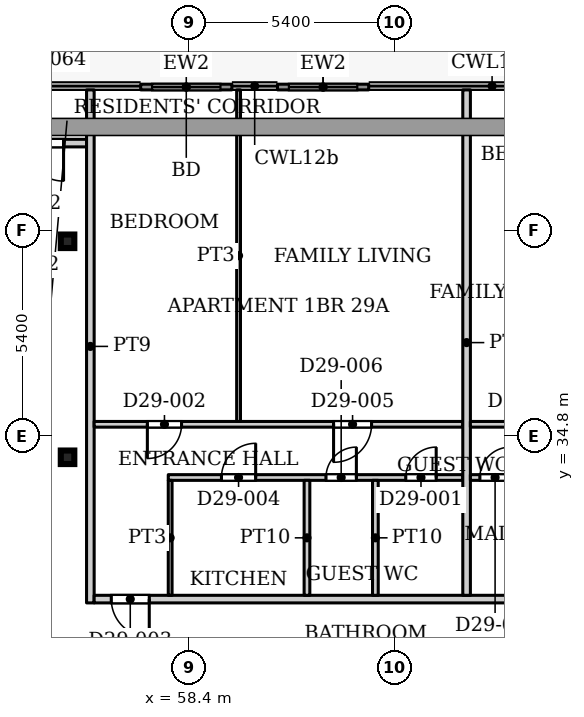
"""IFC4 building model, lengths in metres.
Left out: names, types, materials, properties, quantities, classifications, styles, units other than length and angle.
Written with IfcOpenShell. Run it as: python <this file> out.ifc"""

import sys

from ifc_helpers import new_model, si_unit, direction, frame, frame_2d, origin, origin_2d, place, context, subcontext, project, spatial, rectangle, hollow_rectangle, extrude, source, transform, mapped, element, fill, save


model = new_model("IFC4")
c1 = context("Model", 3, precision=1e-05, world=origin(), true_north=direction((0.0, 1.0)))
c2 = subcontext(c1, "Body", "Model", "MODEL_VIEW")
j1 = project(units=[si_unit("LENGTHUNIT", "METRE"), si_unit("PLANEANGLEUNIT", "RADIAN")], contexts=[c1])
p1 = place(None, origin())
s1 = spatial("IfcSite", under=j1, at=p1, CompositionType="ELEMENT")
p2 = place(p1, origin())
s2 = spatial("IfcBuilding", under=s1, at=p2, CompositionType="ELEMENT")
p3 = place(p2, frame((0.0, 0.0, 125.3)))
s3 = spatial("IfcBuildingStorey", under=s2, at=p3, CompositionType="ELEMENT", Elevation=125.3)
for number, where, z_axis, x_axis in (
    (1, (55.2, 34.232, 0.0), (0.0, 0.0, 1.0), (1.0, 0.0, 0.0)),
    (2, (55.2, 39.916, 0.0), (0.0, 0.0, 1.0), (1.0, 0.0, 0.0)),
):
    element("IfcColumn", number, at=place(p3, frame(where, z_axis=z_axis, x_axis=x_axis)), inside=s3, PredefinedType="COLUMN", context=c2, shape_type="SweptSolid", body=[
        extrude(hollow_rectangle(XDim=0.356, YDim=0.356, WallThickness=0.016, InnerFilletRadius=0.016, OuterFilletRadius=0.032, at=origin_2d()), origin(), (0.0, 0.0, 1.0), 3.9),
    ])
p4 = place(p3, frame((57.124, 43.975, 0.0), z_axis=(0.0, 0.0, 1.0), x_axis=(1.0, 0.0, 0.0)))
e3 = element("IfcWall", 3, at=p4, inside=s3, PredefinedType="SOLIDWALL", context=c2, shape_type="SweptSolid", body=[
    extrude(rectangle(XDim=2.4, YDim=0.15, at=frame_2d((1.2, 0.0))), origin(), (0.0, 0.0, 1.0), 3.75),
])
p5 = place(p4, frame((0.3, 0.0, 0.0)))
e4 = element("IfcOpeningElement", 4, at=p5, cuts=e3, PredefinedType="OPENING", context=c2, shape_type="SweptSolid", body=[
    extrude(rectangle(XDim=1.8, YDim=2.4, at=frame_2d((0.9, 1.2))), frame((0.0, 0.085, 0.0), z_axis=(0.0, -1.0, 0.0), x_axis=(1.0, 0.0, 0.0)), (0.0, 0.0, 1.0), 0.17),
])
p6 = place(p3, frame((60.724, 43.975, 0.0), z_axis=(0.0, 0.0, 1.0), x_axis=(1.0, 0.0, 0.0)))
e5 = element("IfcWall", 5, at=p6, inside=s3, PredefinedType="SOLIDWALL", context=c2, shape_type="SweptSolid", body=[
    extrude(rectangle(XDim=2.4, YDim=0.15, at=frame_2d((1.2, 0.0))), origin(), (0.0, 0.0, 1.0), 3.75),
])
p7 = place(p6, frame((0.3, 0.0, 0.0)))
e6 = element("IfcOpeningElement", 6, at=p7, cuts=e5, PredefinedType="OPENING", context=c2, shape_type="SweptSolid", body=[
    extrude(rectangle(XDim=1.8, YDim=2.4, at=frame_2d((0.9, 1.2))), frame((0.0, 0.085, 0.0), z_axis=(0.0, -1.0, 0.0), x_axis=(1.0, 0.0, 0.0)), (0.0, 0.0, 1.0), 0.17),
])
p8 = place(p3, frame((53.4, 42.5, 0.0), z_axis=(0.0, 0.0, 1.0), x_axis=(1.0, 0.0, 0.0)))
e7 = element("IfcWall", 7, at=p8, inside=s3, PredefinedType="PARTITIONING", context=c2, shape_type="SweptSolid", body=[
    extrude(rectangle(XDim=2.3, YDim=0.2, at=frame_2d((1.15, 0.0))), origin(), (0.0, 0.0, 1.0), 3.6),
])
p9 = place(p8, frame((0.695, 0.0, 0.0)))
e8 = element("IfcOpeningElement", 8, at=p9, cuts=e7, PredefinedType="OPENING", context=c2, shape_type="SweptSolid", body=[
    extrude(rectangle(XDim=1.0, YDim=2.1, at=frame_2d((0.5, 1.05))), frame((0.0, 0.11, 0.0), z_axis=(0.0, -1.0, 0.0), x_axis=(1.0, 0.0, 0.0)), (0.0, 0.0, 1.0), 0.22),
])
p10 = place(p3, frame((55.8, 30.4, 0.0), z_axis=(0.0, 0.0, 1.0), x_axis=(0.0, 1.0, 0.0)))
e9 = element("IfcWall", 9, at=p10, inside=s3, PredefinedType="PARTITIONING", context=c2, shape_type="SweptSolid", body=[
    extrude(rectangle(XDim=13.5, YDim=0.2, at=frame_2d((6.75, 0.0))), origin(), (0.0, 0.0, 1.0), 3.6),
])
p11 = place(p3, frame((55.9, 30.5, 0.0), z_axis=(0.0, 0.0, 1.0), x_axis=(1.0, 0.0, 0.0)))
e10 = element("IfcWall", 10, at=p11, inside=s3, PredefinedType="PARTITIONING", context=c2, shape_type="SweptSolid", body=[
    extrude(rectangle(XDim=42.2, YDim=0.2, at=frame_2d((21.1, 0.0))), origin(), (0.0, 0.0, 1.0), 3.6),
])
p12 = place(p11, frame((0.45, 0.0, 0.0)))
e11 = element("IfcOpeningElement", 11, at=p12, cuts=e10, PredefinedType="OPENING", context=c2, shape_type="SweptSolid", body=[
    extrude(rectangle(XDim=1.0, YDim=2.1, at=frame_2d((0.5, 1.05))), frame((0.0, 0.11, 0.0), z_axis=(0.0, -1.0, 0.0), x_axis=(1.0, 0.0, 0.0)), (0.0, 0.0, 1.0), 0.22),
])
p13 = place(p11, frame((20.1, 0.0, 0.0)))
e12 = element("IfcOpeningElement", 12, at=p13, cuts=e10, PredefinedType="OPENING", context=c2, shape_type="SweptSolid", body=[
    extrude(rectangle(XDim=1.0, YDim=2.1, at=frame_2d((0.5, 1.05))), frame((0.0, 0.11, 0.0), z_axis=(0.0, -1.0, 0.0), x_axis=(1.0, 0.0, 0.0)), (0.0, 0.0, 1.0), 0.22),
])
p14 = place(p11, frame((33.75, 0.0, 0.0)))
e13 = element("IfcOpeningElement", 13, at=p14, cuts=e10, PredefinedType="OPENING", context=c2, shape_type="SweptSolid", body=[
    extrude(rectangle(XDim=1.0, YDim=2.1, at=frame_2d((0.5, 1.05))), frame((0.0, 0.11, 0.0), z_axis=(0.0, -1.0, 0.0), x_axis=(1.0, 0.0, 0.0)), (0.0, 0.0, 1.0), 0.22),
])
p15 = place(p11, frame((38.7, 0.0, 0.0)))
e14 = element("IfcOpeningElement", 14, at=p15, cuts=e10, PredefinedType="OPENING", context=c2, shape_type="SweptSolid", body=[
    extrude(rectangle(XDim=1.0, YDim=2.1, at=frame_2d((0.5, 1.05))), frame((0.0, 0.11, 0.0), z_axis=(0.0, -1.0, 0.0), x_axis=(1.0, 0.0, 0.0)), (0.0, 0.0, 1.0), 0.22),
])
p16 = place(p3, frame((55.9, 35.1, 0.0), z_axis=(0.0, 0.0, 1.0), x_axis=(1.0, 0.0, 0.0)))
e15 = element("IfcWall", 15, at=p16, inside=s3, PredefinedType="PARTITIONING", context=c2, shape_type="SweptSolid", body=[
    extrude(rectangle(XDim=9.7, YDim=0.15, at=frame_2d((4.85, 0.0))), origin(), (0.0, 0.0, 1.0), 3.6),
])
p17 = place(p16, frame((1.4, 0.0, 0.0)))
e16 = element("IfcOpeningElement", 16, at=p17, cuts=e15, PredefinedType="OPENING", context=c2, shape_type="SweptSolid", body=[
    extrude(rectangle(XDim=0.9, YDim=2.1, at=frame_2d((0.45, 1.05))), frame((0.0, 0.085, 0.0), z_axis=(0.0, -1.0, 0.0), x_axis=(1.0, 0.0, 0.0)), (0.0, 0.0, 1.0), 0.17),
])
p18 = place(p16, frame((6.3, 0.0, 0.0)))
e17 = element("IfcOpeningElement", 17, at=p18, cuts=e15, PredefinedType="OPENING", context=c2, shape_type="SweptSolid", body=[
    extrude(rectangle(XDim=1.0, YDim=2.1, at=frame_2d((0.5, 1.05))), frame((0.0, 0.085, 0.0), z_axis=(0.0, -1.0, 0.0), x_axis=(1.0, 0.0, 0.0)), (0.0, 0.0, 1.0), 0.17),
])
p19 = place(p3, frame((57.85, 33.7, 0.0), z_axis=(0.0, 0.0, 1.0), x_axis=(1.0, 0.0, 0.0)))
e18 = element("IfcWall", 18, at=p19, inside=s3, PredefinedType="PARTITIONING", context=c2, shape_type="SweptSolid", body=[
    extrude(rectangle(XDim=7.75, YDim=0.15, at=frame_2d((3.875, 0.0))), origin(), (0.0, 0.0, 1.0), 3.6),
])
p20 = place(p19, frame((6.25, 0.0, 0.0)))
e19 = element("IfcOpeningElement", 19, at=p20, cuts=e18, PredefinedType="OPENING", context=c2, shape_type="SweptSolid", body=[
    extrude(rectangle(XDim=0.8, YDim=2.1, at=frame_2d((0.4, 1.05))), frame((0.0, 0.085, 0.0), z_axis=(0.0, -1.0, 0.0), x_axis=(1.0, 0.0, 0.0)), (0.0, 0.0, 1.0), 0.17),
])
p21 = place(p19, frame((1.4, 0.0, 0.0)))
e20 = element("IfcOpeningElement", 20, at=p21, cuts=e18, PredefinedType="OPENING", context=c2, shape_type="SweptSolid", body=[
    extrude(rectangle(XDim=0.9, YDim=2.1, at=frame_2d((0.45, 1.05))), frame((0.0, 0.085, 0.0), z_axis=(0.0, -1.0, 0.0), x_axis=(1.0, 0.0, 0.0)), (0.0, 0.0, 1.0), 0.17),
])
p22 = place(p19, frame((4.15, 0.0, 0.0)))
e21 = element("IfcOpeningElement", 21, at=p22, cuts=e18, PredefinedType="OPENING", context=c2, shape_type="SweptSolid", body=[
    extrude(rectangle(XDim=0.8, YDim=2.1, at=frame_2d((0.4, 1.05))), frame((0.0, 0.085, 0.0), z_axis=(0.0, -1.0, 0.0), x_axis=(1.0, 0.0, 0.0)), (0.0, 0.0, 1.0), 0.17),
])
p23 = place(p3, frame((57.9, 30.6, 0.0), z_axis=(0.0, 0.0, 1.0), x_axis=(0.0, 1.0, 0.0)))
e22 = element("IfcWall", 22, at=p23, inside=s3, PredefinedType="PARTITIONING", context=c2, shape_type="SweptSolid", body=[
    extrude(rectangle(XDim=3.025, YDim=0.1, at=frame_2d((1.512, 0.0))), origin(), (0.0, 0.0, 1.0), 3.6),
])
p24 = place(p3, frame((59.7, 35.175, 0.0), z_axis=(0.0, 0.0, 1.0), x_axis=(0.0, 1.0, 0.0)))
e23 = element("IfcWall", 23, at=p24, inside=s3, PredefinedType="PARTITIONING", context=c2, shape_type="SweptSolid", body=[
    extrude(rectangle(XDim=8.725, YDim=0.1, at=frame_2d((4.362, 0.0))), origin(), (0.0, 0.0, 1.0), 3.6),
])
for number, where, z_axis, x_axis in (
    (24, (61.5, 30.6, 0.0), (0.0, 0.0, 1.0), (0.0, 1.0, 0.0)),
    (25, (63.3, 30.6, 0.0), (0.0, 0.0, 1.0), (0.0, 1.0, 0.0)),
):
    element("IfcWall", number, at=place(p3, frame(where, z_axis=z_axis, x_axis=x_axis)), inside=s3, PredefinedType="PARTITIONING", context=c2, shape_type="SweptSolid", body=[
        extrude(rectangle(XDim=3.025, YDim=0.15, at=frame_2d((1.512, 0.0))), origin(), (0.0, 0.0, 1.0), 3.6),
    ])
p25 = place(p3, frame((65.7, 30.6, 0.0), z_axis=(0.0, 0.0, 1.0), x_axis=(0.0, 1.0, 0.0)))
e26 = element("IfcWall", 26, at=p25, inside=s3, PredefinedType="PARTITIONING", context=c2, shape_type="SweptSolid", body=[
    extrude(rectangle(XDim=13.3, YDim=0.2, at=frame_2d((6.65, 0.0))), origin(), (0.0, 0.0, 1.0), 3.6),
])
p26 = place(p3, frame((65.8, 33.7, 0.0), z_axis=(0.0, 0.0, 1.0), x_axis=(1.0, 0.0, 0.0)))
e27 = element("IfcWall", 27, at=p26, inside=s3, PredefinedType="PARTITIONING", context=c2, shape_type="SweptSolid", body=[
    extrude(rectangle(XDim=9.875, YDim=0.15, at=frame_2d((4.938, 0.0))), origin(), (0.0, 0.0, 1.0), 3.6),
])
p27 = place(p26, frame((8.35, 0.0, 0.0)))
e28 = element("IfcOpeningElement", 28, at=p27, cuts=e27, PredefinedType="OPENING", context=c2, shape_type="SweptSolid", body=[
    extrude(rectangle(XDim=0.8, YDim=2.1, at=frame_2d((0.4, 1.05))), frame((0.0, 0.085, 0.0), z_axis=(0.0, -1.0, 0.0), x_axis=(1.0, 0.0, 0.0)), (0.0, 0.0, 1.0), 0.17),
])
p28 = place(p26, frame((5.75, 0.0, 0.0)))
e29 = element("IfcOpeningElement", 29, at=p28, cuts=e27, PredefinedType="OPENING", context=c2, shape_type="SweptSolid", body=[
    extrude(rectangle(XDim=0.9, YDim=2.1, at=frame_2d((0.45, 1.05))), frame((0.0, 0.085, 0.0), z_axis=(0.0, -1.0, 0.0), x_axis=(1.0, 0.0, 0.0)), (0.0, 0.0, 1.0), 0.17),
])
p29 = place(p26, frame((3.6, 0.0, 0.0)))
e30 = element("IfcOpeningElement", 30, at=p29, cuts=e27, PredefinedType="OPENING", context=c2, shape_type="SweptSolid", body=[
    extrude(rectangle(XDim=0.8, YDim=2.1, at=frame_2d((0.4, 1.05))), frame((0.0, 0.085, 0.0), z_axis=(0.0, -1.0, 0.0), x_axis=(1.0, 0.0, 0.0)), (0.0, 0.0, 1.0), 0.17),
])
p30 = place(p26, frame((0.25, 0.0, 0.0)))
e31 = element("IfcOpeningElement", 31, at=p30, cuts=e27, PredefinedType="OPENING", context=c2, shape_type="SweptSolid", body=[
    extrude(rectangle(XDim=0.8, YDim=2.1, at=frame_2d((0.4, 1.05))), frame((0.0, 0.085, 0.0), z_axis=(0.0, -1.0, 0.0), x_axis=(1.0, 0.0, 0.0)), (0.0, 0.0, 1.0), 0.17),
])
p31 = place(p3, frame((65.8, 35.1, 0.0), z_axis=(0.0, 0.0, 1.0), x_axis=(1.0, 0.0, 0.0)))
e32 = element("IfcWall", 32, at=p31, inside=s3, PredefinedType="PARTITIONING", context=c2, shape_type="SweptSolid", body=[
    extrude(rectangle(XDim=15.7, YDim=0.15, at=frame_2d((7.85, 0.0))), origin(), (0.0, 0.0, 1.0), 3.6),
])
p32 = place(p31, frame((3.95, 0.0, 0.0)))
e33 = element("IfcOpeningElement", 33, at=p32, cuts=e32, PredefinedType="OPENING", context=c2, shape_type="SweptSolid", body=[
    extrude(rectangle(XDim=0.9, YDim=2.1, at=frame_2d((0.45, 1.05))), frame((0.0, 0.085, 0.0), z_axis=(0.0, -1.0, 0.0), x_axis=(1.0, 0.0, 0.0)), (0.0, 0.0, 1.0), 0.17),
])
p33 = place(p31, frame((14.0, 0.0, 0.0)))
e34 = element("IfcOpeningElement", 34, at=p33, cuts=e32, PredefinedType="OPENING", context=c2, shape_type="SweptSolid", body=[
    extrude(rectangle(XDim=0.9, YDim=2.1, at=frame_2d((0.45, 1.05))), frame((0.0, 0.085, 0.0), z_axis=(0.0, -1.0, 0.0), x_axis=(1.0, 0.0, 0.0)), (0.0, 0.0, 1.0), 0.17),
])
p34 = place(p31, frame((1.05, 0.0, 0.0)))
e35 = element("IfcOpeningElement", 35, at=p34, cuts=e32, PredefinedType="OPENING", context=c2, shape_type="SweptSolid", body=[
    extrude(rectangle(XDim=1.0, YDim=2.1, at=frame_2d((0.5, 1.05))), frame((0.0, 0.085, 0.0), z_axis=(0.0, -1.0, 0.0), x_axis=(1.0, 0.0, 0.0)), (0.0, 0.0, 1.0), 0.17),
])
p35 = place(p31, frame((10.5, 0.0, 0.0)))
e36 = element("IfcOpeningElement", 36, at=p35, cuts=e32, PredefinedType="OPENING", context=c2, shape_type="SweptSolid", body=[
    extrude(rectangle(XDim=1.6, YDim=2.1, at=frame_2d((0.8, 1.05))), frame((0.0, 0.085, 0.0), z_axis=(0.0, -1.0, 0.0), x_axis=(1.0, 0.0, 0.0)), (0.0, 0.0, 1.0), 0.17),
])
p36 = place(p31, frame((6.05, 0.0, 0.0)))
e37 = element("IfcOpeningElement", 37, at=p36, cuts=e32, PredefinedType="OPENING", context=c2, shape_type="SweptSolid", body=[
    extrude(rectangle(XDim=0.9, YDim=2.1, at=frame_2d((0.45, 1.05))), frame((0.0, 0.085, 0.0), z_axis=(0.0, -1.0, 0.0), x_axis=(1.0, 0.0, 0.0)), (0.0, 0.0, 1.0), 0.17),
])
m1 = source(origin(), c2, "Body", "SweptSolid", [
    extrude(rectangle(XDim=1.8, YDim=2.4, at=frame_2d((0.9, 1.2))), frame((0.0, 0.025, 0.0), z_axis=(0.0, -1.0, 0.0), x_axis=(1.0, 0.0, 0.0)), (0.0, 0.0, 1.0), 0.05),
])
p37 = place(p5, origin())
e38 = element("IfcDoor", 38, at=p37, inside=s3, OperationType="SLIDING_TO_LEFT", PredefinedType="DOOR", context=c2, shape_type="MappedRepresentation", body=[
    mapped(m1, transform((0.0, 0.0, 0.0), x_axis=(1.0, 0.0, 0.0), y_axis=(0.0, 1.0, 0.0), z_axis=(0.0, 0.0, 1.0), scale=1.0)),
])
fill(e4, e38)
p38 = place(p7, origin())
e39 = element("IfcDoor", 39, at=p38, inside=s3, OperationType="SLIDING_TO_LEFT", PredefinedType="DOOR", context=c2, shape_type="MappedRepresentation", body=[
    mapped(m1, transform((0.0, 0.0, 0.0), x_axis=(1.0, 0.0, 0.0), y_axis=(0.0, 1.0, 0.0), z_axis=(0.0, 0.0, 1.0), scale=1.0)),
])
fill(e6, e39)
m2 = source(origin(), c2, "Body", "SweptSolid", [
    extrude(rectangle(XDim=0.8, YDim=2.1, at=frame_2d((0.4, 1.05))), frame((0.0, 0.025, 0.0), z_axis=(0.0, -1.0, 0.0), x_axis=(1.0, 0.0, 0.0)), (0.0, 0.0, 1.0), 0.05),
])
p39 = place(p20, origin())
e40 = element("IfcDoor", 40, at=p39, inside=s3, OperationType="SINGLE_SWING_LEFT", PredefinedType="DOOR", context=c2, shape_type="MappedRepresentation", body=[
    mapped(m2, transform((0.0, 0.0, 0.0), x_axis=(1.0, 0.0, 0.0), y_axis=(0.0, 1.0, 0.0), z_axis=(0.0, 0.0, 1.0), scale=1.0)),
])
fill(e19, e40)
m3 = source(origin(), c2, "Body", "SweptSolid", [
    extrude(rectangle(XDim=0.9, YDim=2.1, at=frame_2d((0.45, 1.05))), frame((0.0, 0.025, 0.0), z_axis=(0.0, -1.0, 0.0), x_axis=(1.0, 0.0, 0.0)), (0.0, 0.0, 1.0), 0.05),
])
p40 = place(p17, origin())
e41 = element("IfcDoor", 41, at=p40, inside=s3, OperationType="SINGLE_SWING_RIGHT", PredefinedType="DOOR", context=c2, shape_type="MappedRepresentation", body=[
    mapped(m3, transform((0.0, 0.0, 0.0), x_axis=(1.0, 0.0, 0.0), y_axis=(0.0, 1.0, 0.0), z_axis=(0.0, 0.0, 1.0), scale=1.0)),
])
fill(e16, e41)
m4 = source(origin(), c2, "Body", "SweptSolid", [
    extrude(rectangle(XDim=1.0, YDim=2.1, at=frame_2d((0.5, 1.05))), frame((0.0, 0.025, 0.0), z_axis=(0.0, -1.0, 0.0), x_axis=(1.0, 0.0, 0.0)), (0.0, 0.0, 1.0), 0.05),
])
p41 = place(p12, origin())
e42 = element("IfcDoor", 42, at=p41, inside=s3, OperationType="SINGLE_SWING_RIGHT", PredefinedType="DOOR", context=c2, shape_type="MappedRepresentation", body=[
    mapped(m4, transform((0.0, 0.0, 0.0), x_axis=(1.0, 0.0, 0.0), y_axis=(0.0, 1.0, 0.0), z_axis=(0.0, 0.0, 1.0), scale=1.0)),
])
fill(e11, e42)
p42 = place(p21, origin())
e43 = element("IfcDoor", 43, at=p42, inside=s3, OperationType="SINGLE_SWING_LEFT", PredefinedType="DOOR", context=c2, shape_type="MappedRepresentation", body=[
    mapped(m3, transform((0.0, 0.0, 0.0), x_axis=(1.0, 0.0, 0.0), y_axis=(0.0, 1.0, 0.0), z_axis=(0.0, 0.0, 1.0), scale=1.0)),
])
fill(e20, e43)
m5 = source(origin(), c2, "Body", "SweptSolid", [
    extrude(rectangle(XDim=1.0, YDim=2.1, at=frame_2d((0.5, 1.05))), frame((0.0, 0.025, 0.0), z_axis=(0.0, -1.0, 0.0), x_axis=(1.0, 0.0, 0.0)), (0.0, 0.0, 1.0), 0.05),
])
p43 = place(p18, origin())
e44 = element("IfcDoor", 44, at=p43, inside=s3, OperationType="SINGLE_SWING_RIGHT", PredefinedType="DOOR", context=c2, shape_type="MappedRepresentation", body=[
    mapped(m5, transform((0.0, 0.0, 0.0), x_axis=(1.0, 0.0, 0.0), y_axis=(0.0, 1.0, 0.0), z_axis=(0.0, 0.0, 1.0), scale=1.0)),
])
fill(e17, e44)
p44 = place(p22, origin())
e45 = element("IfcDoor", 45, at=p44, inside=s3, OperationType="SINGLE_SWING_LEFT", PredefinedType="DOOR", context=c2, shape_type="MappedRepresentation", body=[
    mapped(m2, transform((0.0, 0.0, 0.0), x_axis=(1.0, 0.0, 0.0), y_axis=(0.0, 1.0, 0.0), z_axis=(0.0, 0.0, 1.0), scale=1.0)),
])
fill(e21, e45)
p45 = place(p30, origin())
e46 = element("IfcDoor", 46, at=p45, inside=s3, OperationType="SINGLE_SWING_LEFT", PredefinedType="DOOR", context=c2, shape_type="MappedRepresentation", body=[
    mapped(m2, transform((0.0, 0.0, 0.0), x_axis=(1.0, 0.0, 0.0), y_axis=(0.0, 1.0, 0.0), z_axis=(0.0, 0.0, 1.0), scale=1.0)),
])
fill(e31, e46)
m6 = source(origin(), c2, "Body", "SweptSolid", [
    extrude(rectangle(XDim=1.0, YDim=2.1, at=frame_2d((0.5, 1.05))), frame((0.0, 0.025, 0.0), z_axis=(0.0, -1.0, 0.0), x_axis=(1.0, 0.0, 0.0)), (0.0, 0.0, 1.0), 0.05),
])
p46 = place(p9, origin())
e47 = element("IfcDoor", 47, at=p46, inside=s3, OperationType="SINGLE_SWING_RIGHT", PredefinedType="DOOR", context=c2, shape_type="MappedRepresentation", body=[
    mapped(m6, transform((0.0, 0.0, 0.0), x_axis=(1.0, 0.0, 0.0), y_axis=(0.0, 1.0, 0.0), z_axis=(0.0, 0.0, 1.0), scale=1.0)),
])
fill(e8, e47)
save(model, sys.argv[1])
